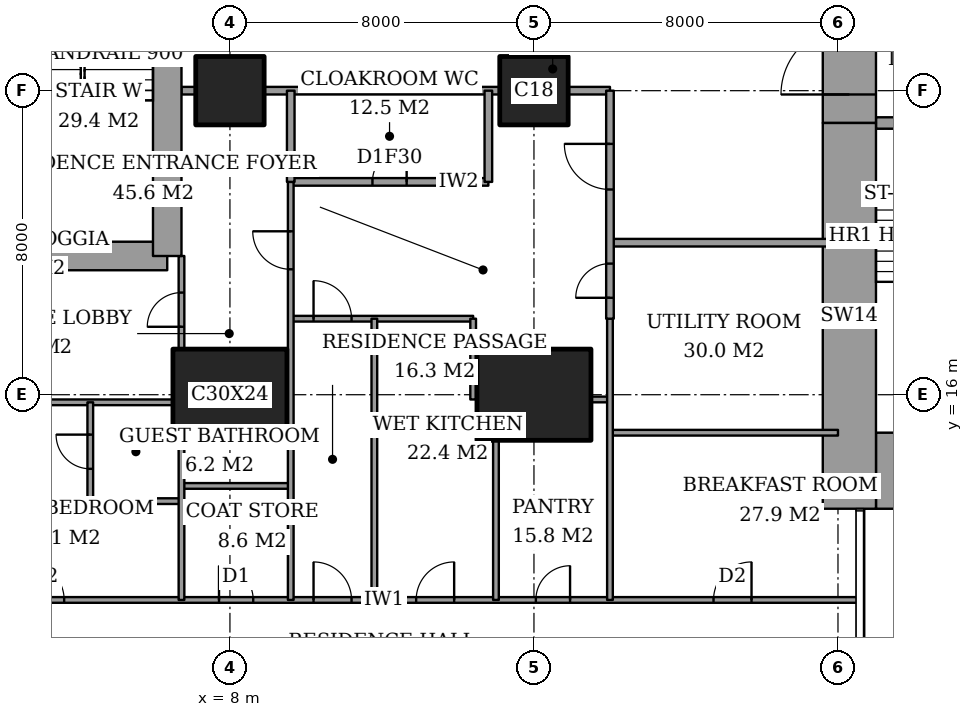
"""IFC4 building model, lengths in metres.
Left out: names, types, materials, properties, quantities, classifications, styles, units other than length and angle.
Written with IfcOpenShell. Run it as: python <this file> out.ifc"""

import sys

from ifc_helpers import new_model, si_unit, direction, frame, frame_2d, origin, origin_2d, place, context, subcontext, project, spatial, rectangle, extrude, element, fill, save


model = new_model("IFC4")
c1 = context("Model", 3, precision=1e-05, world=origin(), true_north=direction((0.0, 1.0)))
c2 = subcontext(c1, "Body", "Model", "MODEL_VIEW")
j1 = project(units=[si_unit("LENGTHUNIT", "METRE"), si_unit("PLANEANGLEUNIT", "RADIAN")], contexts=[c1])
p1 = place(None, origin())
s1 = spatial("IfcSite", under=j1, at=p1, CompositionType="ELEMENT")
p2 = place(p1, origin())
s2 = spatial("IfcBuilding", under=s1, at=p2, CompositionType="ELEMENT")
p3 = place(p2, frame((0.0, 0.0, 196.6)))
s3 = spatial("IfcBuildingStorey", under=s2, at=p3, CompositionType="ELEMENT", Elevation=196.6)
p4 = place(p3, frame((8.0, 16.0, 0.0), z_axis=(0.0, 0.0, 1.0), x_axis=(1.0, 0.0, 0.0)))
e1 = element("IfcColumn", 1, at=p4, inside=s3, PredefinedType="COLUMN", context=c2, shape_type="SweptSolid", body=[
    extrude(rectangle(XDim=3.0, YDim=2.4, at=origin_2d()), origin(), (0.0, 0.0, 1.0), 3.6),
])
p5 = place(p3, frame((8.0, 24.0, 0.0), z_axis=(0.0, 0.0, 1.0), x_axis=(1.0, 0.0, 0.0)))
e2 = element("IfcColumn", 2, at=p5, inside=s3, PredefinedType="COLUMN", context=c2, shape_type="SweptSolid", body=[
    extrude(rectangle(XDim=1.8, YDim=1.8, at=origin_2d()), origin(), (0.0, 0.0, 1.0), 3.6),
])
p6 = place(p3, frame((16.0, 16.0, 0.0), z_axis=(0.0, 0.0, 1.0), x_axis=(1.0, 0.0, 0.0)))
e3 = element("IfcColumn", 3, at=p6, inside=s3, PredefinedType="COLUMN", context=c2, shape_type="SweptSolid", body=[
    extrude(rectangle(XDim=3.0, YDim=2.4, at=origin_2d()), origin(), (0.0, 0.0, 1.0), 3.6),
])
p7 = place(p3, frame((16.0, 24.0, 0.0), z_axis=(0.0, 0.0, 1.0), x_axis=(1.0, 0.0, 0.0)))
e4 = element("IfcColumn", 4, at=p7, inside=s3, PredefinedType="COLUMN", context=c2, shape_type="SweptSolid", body=[
    extrude(rectangle(XDim=1.8, YDim=1.8, at=origin_2d()), origin(), (0.0, 0.0, 1.0), 3.6),
])
p8 = place(p3, frame((25.0, 14.0, 0.0), z_axis=(0.0, 0.0, 1.0), x_axis=(1.0, 0.0, 0.0)))
e5 = element("IfcWall", 5, at=p8, inside=s3, PredefinedType="SHEAR", context=c2, shape_type="SweptSolid", body=[
    extrude(rectangle(XDim=3.15, YDim=2.0, at=frame_2d((1.575, 0.0))), origin(), (0.0, 0.0, 1.0), 3.6),
])
p9 = place(p3, frame((24.3, 13.0, 0.0), z_axis=(0.0, 0.0, 1.0), x_axis=(0.0, 1.0, 0.0)))
e6 = element("IfcWall", 6, at=p9, inside=s3, PredefinedType="SHEAR", context=c2, shape_type="SweptSolid", body=[
    extrude(rectangle(XDim=10.15, YDim=1.4, at=frame_2d((5.075, 0.0))), origin(), (0.0, 0.0, 1.0), 3.6),
])
p10 = place(p3, frame((24.3, 23.15, 0.0), z_axis=(0.0, 0.0, 1.0), x_axis=(0.0, 1.0, 0.0)))
e7 = element("IfcWall", 7, at=p10, inside=s3, PredefinedType="SHEAR", context=c2, shape_type="SweptSolid", body=[
    extrude(rectangle(XDim=11.85, YDim=1.4, at=frame_2d((5.925, 0.0))), origin(), (0.0, 0.0, 1.0), 3.6),
])
p11 = place(p10, frame((0.75, 0.0, 0.0)))
e8 = element("IfcOpeningElement", 8, at=p11, cuts=e7, PredefinedType="OPENING", context=c2, shape_type="SweptSolid", body=[
    extrude(rectangle(XDim=1.8, YDim=2.4, at=frame_2d((0.9, 1.2))), frame((0.0, 0.71, 0.0), z_axis=(0.0, -1.0, 0.0), x_axis=(1.0, 0.0, 0.0)), (0.0, 0.0, 1.0), 1.42),
])
p12 = place(p3, frame((25.0, 23.15, 0.0), z_axis=(0.0, 0.0, 1.0), x_axis=(1.0, 0.0, 0.0)))
e9 = element("IfcWall", 9, at=p12, inside=s3, PredefinedType="SHEAR", context=c2, shape_type="SweptSolid", body=[
    extrude(rectangle(XDim=3.15, YDim=0.3, at=frame_2d((1.575, 0.0))), origin(), (0.0, 0.0, 1.0), 3.6),
])
p13 = place(p12, frame((0.6, 0.0, 0.0)))
e10 = element("IfcOpeningElement", 10, at=p13, cuts=e9, PredefinedType="OPENING", context=c2, shape_type="SweptSolid", body=[
    extrude(rectangle(XDim=1.0, YDim=2.1, at=frame_2d((0.5, 1.05))), frame((0.0, 0.16, 0.0), z_axis=(0.0, -1.0, 0.0), x_axis=(1.0, 0.0, 0.0)), (0.0, 0.0, 1.0), 0.32),
])
p14 = place(p3, frame((1.9, 19.65, 0.0), z_axis=(0.0, 0.0, 1.0), x_axis=(1.0, 0.0, 0.0)))
e11 = element("IfcWall", 11, at=p14, inside=s3, PredefinedType="SHEAR", context=c2, shape_type="SweptSolid", body=[
    extrude(rectangle(XDim=4.45, YDim=0.75, at=frame_2d((2.225, 0.0))), origin(), (0.0, 0.0, 1.0), 3.6),
])
p15 = place(p3, frame((6.35, 19.65, 0.0), z_axis=(0.0, 0.0, 1.0), x_axis=(0.0, 1.0, 0.0)))
e12 = element("IfcWall", 12, at=p15, inside=s3, PredefinedType="SHEAR", context=c2, shape_type="SweptSolid", body=[
    extrude(rectangle(XDim=8.7, YDim=0.75, at=frame_2d((4.35, 0.0))), origin(), (0.0, 0.0, 1.0), 3.6),
])
p16 = place(p15, frame((6.725, 0.0, 0.0)))
e13 = element("IfcOpeningElement", 13, at=p16, cuts=e12, PredefinedType="OPENING", context=c2, shape_type="SweptSolid", body=[
    extrude(rectangle(XDim=1.0, YDim=2.1, at=frame_2d((0.5, 1.05))), frame((0.0, 0.385, 0.0), z_axis=(0.0, -1.0, 0.0), x_axis=(1.0, 0.0, 0.0)), (0.0, 0.0, 1.0), 0.77),
])
p17 = place(p3, frame((-0.45, 10.6, 0.0), z_axis=(0.0, 0.0, 1.0), x_axis=(1.0, 0.0, 0.0)))
e14 = element("IfcWall", 14, at=p17, inside=s3, PredefinedType="PARTITIONING", context=c2, shape_type="SweptSolid", body=[
    extrude(rectangle(XDim=25.011, YDim=0.15, at=frame_2d((12.505, 0.0))), origin(), (0.0, 0.0, 1.0), 3.35),
])
p18 = place(p17, frame((10.65, 0.0, 0.0)))
e15 = element("IfcOpeningElement", 15, at=p18, cuts=e14, PredefinedType="OPENING", context=c2, shape_type="SweptSolid", body=[
    extrude(rectangle(XDim=1.0, YDim=2.1, at=frame_2d((0.5, 1.05))), frame((0.0, 0.085, 0.0), z_axis=(0.0, -1.0, 0.0), x_axis=(1.0, 0.0, 0.0)), (0.0, 0.0, 1.0), 0.17),
])
p19 = place(p17, frame((3.087, 0.0, 0.0)))
e16 = element("IfcOpeningElement", 16, at=p19, cuts=e14, PredefinedType="OPENING", context=c2, shape_type="SweptSolid", body=[
    extrude(rectangle(XDim=1.0, YDim=2.1, at=frame_2d((0.5, 1.05))), frame((0.0, 0.085, 0.0), z_axis=(0.0, -1.0, 0.0), x_axis=(1.0, 0.0, 0.0)), (0.0, 0.0, 1.0), 0.17),
])
p20 = place(p17, frame((8.163, 0.0, 0.0)))
e17 = element("IfcOpeningElement", 17, at=p20, cuts=e14, PredefinedType="OPENING", context=c2, shape_type="SweptSolid", body=[
    extrude(rectangle(XDim=0.9, YDim=2.1, at=frame_2d((0.45, 1.05))), frame((0.0, 0.085, 0.0), z_axis=(0.0, -1.0, 0.0), x_axis=(1.0, 0.0, 0.0)), (0.0, 0.0, 1.0), 0.17),
])
p21 = place(p17, frame((13.35, 0.0, 0.0)))
e18 = element("IfcOpeningElement", 18, at=p21, cuts=e14, PredefinedType="OPENING", context=c2, shape_type="SweptSolid", body=[
    extrude(rectangle(XDim=1.0, YDim=2.1, at=frame_2d((0.5, 1.05))), frame((0.0, 0.085, 0.0), z_axis=(0.0, -1.0, 0.0), x_axis=(1.0, 0.0, 0.0)), (0.0, 0.0, 1.0), 0.17),
])
p22 = place(p17, frame((16.5, 0.0, 0.0)))
e19 = element("IfcOpeningElement", 19, at=p22, cuts=e14, PredefinedType="OPENING", context=c2, shape_type="SweptSolid", body=[
    extrude(rectangle(XDim=0.9, YDim=2.1, at=frame_2d((0.45, 1.05))), frame((0.0, 0.085, 0.0), z_axis=(0.0, -1.0, 0.0), x_axis=(1.0, 0.0, 0.0)), (0.0, 0.0, 1.0), 0.17),
])
p23 = place(p17, frame((21.175, 0.0, 0.0)))
e20 = element("IfcOpeningElement", 20, at=p23, cuts=e14, PredefinedType="OPENING", context=c2, shape_type="SweptSolid", body=[
    extrude(rectangle(XDim=1.0, YDim=2.1, at=frame_2d((0.5, 1.05))), frame((0.0, 0.085, 0.0), z_axis=(0.0, -1.0, 0.0), x_axis=(1.0, 0.0, 0.0)), (0.0, 0.0, 1.0), 0.17),
])
p24 = place(p3, frame((4.325, 13.2, 0.0), z_axis=(0.0, 0.0, 1.0), x_axis=(1.0, 0.0, 0.0)))
e21 = element("IfcWall", 21, at=p24, inside=s3, PredefinedType="PARTITIONING", context=c2, shape_type="SweptSolid", body=[
    extrude(rectangle(XDim=2.4, YDim=0.15, at=frame_2d((1.2, 0.0))), origin(), (0.0, 0.0, 1.0), 3.35),
])
p25 = place(p3, frame((6.725, 13.6, 0.0), z_axis=(0.0, 0.0, 1.0), x_axis=(1.0, 0.0, 0.0)))
e22 = element("IfcWall", 22, at=p25, inside=s3, PredefinedType="PARTITIONING", context=c2, shape_type="SweptSolid", body=[
    extrude(rectangle(XDim=2.875, YDim=0.15, at=frame_2d((1.438, 0.0))), origin(), (0.0, 0.0, 1.0), 3.35),
])
p26 = place(p3, frame((18.0, 15.0, 0.0), z_axis=(0.0, 0.0, 1.0), x_axis=(1.0, 0.0, 0.0)))
e23 = element("IfcWall", 23, at=p26, inside=s3, PredefinedType="PARTITIONING", context=c2, shape_type="SweptSolid", body=[
    extrude(rectangle(XDim=6.0, YDim=0.15, at=frame_2d((3.0, 0.0))), origin(), (0.0, 0.0, 1.0), 3.35),
])
p27 = place(p3, frame((1.25, 15.8, 0.0), z_axis=(0.0, 0.0, 1.0), x_axis=(1.0, 0.0, 0.0)))
e24 = element("IfcWall", 24, at=p27, inside=s3, PredefinedType="PARTITIONING", context=c2, shape_type="SweptSolid", body=[
    extrude(rectangle(XDim=5.25, YDim=0.15, at=frame_2d((2.625, 0.0))), origin(), (0.0, 0.0, 1.0), 3.35),
])
p28 = place(p3, frame((17.5, 15.875, 0.0), z_axis=(0.0, 0.0, 1.0), x_axis=(1.0, 0.0, 0.0)))
e25 = element("IfcWall", 25, at=p28, inside=s3, PredefinedType="PARTITIONING", context=c2, shape_type="SweptSolid", body=[
    extrude(rectangle(XDim=0.5, YDim=0.15, at=frame_2d((0.25, 0.0))), origin(), (0.0, 0.0, 1.0), 3.35),
])
p29 = place(p3, frame((9.6, 18.0, 0.0), z_axis=(0.0, 0.0, 1.0), x_axis=(1.0, 0.0, 0.0)))
e26 = element("IfcWall", 26, at=p29, inside=s3, PredefinedType="PARTITIONING", context=c2, shape_type="SweptSolid", body=[
    extrude(rectangle(XDim=4.8, YDim=0.15, at=frame_2d((2.4, 0.0))), origin(), (0.0, 0.0, 1.0), 3.35),
])
p30 = place(p29, frame((0.6, 0.0, 0.0)))
e27 = element("IfcOpeningElement", 27, at=p30, cuts=e26, PredefinedType="OPENING", context=c2, shape_type="SweptSolid", body=[
    extrude(rectangle(XDim=1.0, YDim=2.1, at=frame_2d((0.5, 1.05))), frame((0.0, 0.085, 0.0), z_axis=(0.0, -1.0, 0.0), x_axis=(1.0, 0.0, 0.0)), (0.0, 0.0, 1.0), 0.17),
])
p31 = place(p3, frame((18.0, 20.0, 0.0), z_axis=(0.0, 0.0, 1.0), x_axis=(1.0, 0.0, 0.0)))
e28 = element("IfcWall", 28, at=p31, inside=s3, PredefinedType="PARTITIONING", context=c2, shape_type="SweptSolid", body=[
    extrude(rectangle(XDim=6.0, YDim=0.2, at=frame_2d((3.0, 0.0))), origin(), (0.0, 0.0, 1.0), 3.35),
])
p32 = place(p3, frame((9.6, 21.6, 0.0), z_axis=(0.0, 0.0, 1.0), x_axis=(1.0, 0.0, 0.0)))
e29 = element("IfcWall", 29, at=p32, inside=s3, PredefinedType="PARTITIONING", context=c2, shape_type="SweptSolid", body=[
    extrude(rectangle(XDim=5.2, YDim=0.2, at=frame_2d((2.6, 0.0))), origin(), (0.0, 0.0, 1.0), 3.35),
])
p33 = place(p32, frame((2.15, 0.0, 0.0)))
e30 = element("IfcOpeningElement", 30, at=p33, cuts=e29, PredefinedType="OPENING", context=c2, shape_type="SweptSolid", body=[
    extrude(rectangle(XDim=0.9, YDim=2.1, at=frame_2d((0.45, 1.05))), frame((0.0, 0.11, 0.0), z_axis=(0.0, -1.0, 0.0), x_axis=(1.0, 0.0, 0.0)), (0.0, 0.0, 1.0), 0.22),
])
p34 = place(p3, frame((6.725, 24.0, 0.0), z_axis=(0.0, 0.0, 1.0), x_axis=(1.0, 0.0, 0.0)))
e31 = element("IfcWall", 31, at=p34, inside=s3, PredefinedType="PARTITIONING", context=c2, shape_type="SweptSolid", body=[
    extrude(rectangle(XDim=0.375, YDim=0.2, at=frame_2d((0.188, 0.0))), origin(), (0.0, 0.0, 1.0), 3.35),
])
p35 = place(p3, frame((8.9, 24.0, 0.0), z_axis=(0.0, 0.0, 1.0), x_axis=(1.0, 0.0, 0.0)))
e32 = element("IfcWall", 32, at=p35, inside=s3, PredefinedType="PARTITIONING", context=c2, shape_type="SweptSolid", body=[
    extrude(rectangle(XDim=6.2, YDim=0.2, at=frame_2d((3.1, 0.0))), origin(), (0.0, 0.0, 1.0), 3.35),
])
p36 = place(p3, frame((16.9, 24.0, 0.0), z_axis=(0.0, 0.0, 1.0), x_axis=(1.0, 0.0, 0.0)))
e33 = element("IfcWall", 33, at=p36, inside=s3, PredefinedType="PARTITIONING", context=c2, shape_type="SweptSolid", body=[
    extrude(rectangle(XDim=1.1, YDim=0.2, at=frame_2d((0.55, 0.0))), origin(), (0.0, 0.0, 1.0), 3.35),
])
p37 = place(p3, frame((4.325, 13.2, 0.0), z_axis=(0.0, 0.0, 1.0), x_axis=(0.0, 1.0, 0.0)))
e34 = element("IfcWall", 34, at=p37, inside=s3, PredefinedType="PARTITIONING", context=c2, shape_type="SweptSolid", body=[
    extrude(rectangle(XDim=2.6, YDim=0.15, at=frame_2d((1.3, 0.0))), origin(), (0.0, 0.0, 1.0), 3.35),
])
p38 = place(p37, frame((0.85, 0.0, 0.0)))
e35 = element("IfcOpeningElement", 35, at=p38, cuts=e34, PredefinedType="OPENING", context=c2, shape_type="SweptSolid", body=[
    extrude(rectangle(XDim=0.9, YDim=2.1, at=frame_2d((0.45, 1.05))), frame((0.0, 0.085, 0.0), z_axis=(0.0, -1.0, 0.0), x_axis=(1.0, 0.0, 0.0)), (0.0, 0.0, 1.0), 0.17),
])
p39 = place(p3, frame((6.725, 10.6, 0.0), z_axis=(0.0, 0.0, 1.0), x_axis=(0.0, 1.0, 0.0)))
e36 = element("IfcWall", 36, at=p39, inside=s3, PredefinedType="PARTITIONING", context=c2, shape_type="SweptSolid", body=[
    extrude(rectangle(XDim=4.2, YDim=0.15, at=frame_2d((2.1, 0.0))), origin(), (0.0, 0.0, 1.0), 3.35),
])
p40 = place(p3, frame((6.725, 17.2, 0.0), z_axis=(0.0, 0.0, 1.0), x_axis=(0.0, 1.0, 0.0)))
e37 = element("IfcWall", 37, at=p40, inside=s3, PredefinedType="PARTITIONING", context=c2, shape_type="SweptSolid", body=[
    extrude(rectangle(XDim=2.45, YDim=0.15, at=frame_2d((1.225, 0.0))), origin(), (0.0, 0.0, 1.0), 3.35),
])
p41 = place(p40, frame((0.587, 0.0, 0.0)))
e38 = element("IfcOpeningElement", 38, at=p41, cuts=e37, PredefinedType="OPENING", context=c2, shape_type="SweptSolid", body=[
    extrude(rectangle(XDim=0.9, YDim=2.1, at=frame_2d((0.45, 1.05))), frame((0.0, 0.085, 0.0), z_axis=(0.0, -1.0, 0.0), x_axis=(1.0, 0.0, 0.0)), (0.0, 0.0, 1.0), 0.17),
])
p42 = place(p3, frame((9.6, 21.6, 0.0), z_axis=(0.0, 0.0, 1.0), x_axis=(0.0, 1.0, 0.0)))
e39 = element("IfcWall", 39, at=p42, inside=s3, PredefinedType="PARTITIONING", context=c2, shape_type="SweptSolid", body=[
    extrude(rectangle(XDim=2.4, YDim=0.2, at=frame_2d((1.2, 0.0))), origin(), (0.0, 0.0, 1.0), 3.35),
])
p43 = place(p3, frame((9.6, 10.6, 0.0), z_axis=(0.0, 0.0, 1.0), x_axis=(0.0, 1.0, 0.0)))
e40 = element("IfcWall", 40, at=p43, inside=s3, PredefinedType="PARTITIONING", context=c2, shape_type="SweptSolid", body=[
    extrude(rectangle(XDim=11.0, YDim=0.15, at=frame_2d((5.5, 0.0))), origin(), (0.0, 0.0, 1.0), 3.35),
])
p44 = place(p43, frame((8.7, 0.0, 0.0)))
e41 = element("IfcOpeningElement", 41, at=p44, cuts=e40, PredefinedType="OPENING", context=c2, shape_type="SweptSolid", body=[
    extrude(rectangle(XDim=1.0, YDim=2.1, at=frame_2d((0.5, 1.05))), frame((0.0, 0.085, 0.0), z_axis=(0.0, -1.0, 0.0), x_axis=(1.0, 0.0, 0.0)), (0.0, 0.0, 1.0), 0.17),
])
p45 = place(p3, frame((11.8, 10.6, 0.0), z_axis=(0.0, 0.0, 1.0), x_axis=(0.0, 1.0, 0.0)))
e42 = element("IfcWall", 42, at=p45, inside=s3, PredefinedType="PARTITIONING", context=c2, shape_type="SweptSolid", body=[
    extrude(rectangle(XDim=7.4, YDim=0.15, at=frame_2d((3.7, 0.0))), origin(), (0.0, 0.0, 1.0), 3.35),
])
p46 = place(p3, frame((14.4, 15.875, 0.0), z_axis=(0.0, 0.0, 1.0), x_axis=(0.0, 1.0, 0.0)))
e43 = element("IfcWall", 43, at=p46, inside=s3, PredefinedType="PARTITIONING", context=c2, shape_type="SweptSolid", body=[
    extrude(rectangle(XDim=2.125, YDim=0.15, at=frame_2d((1.062, 0.0))), origin(), (0.0, 0.0, 1.0), 3.35),
])
p47 = place(p3, frame((14.8, 21.6, 0.0), z_axis=(0.0, 0.0, 1.0), x_axis=(0.0, 1.0, 0.0)))
e44 = element("IfcWall", 44, at=p47, inside=s3, PredefinedType="PARTITIONING", context=c2, shape_type="SweptSolid", body=[
    extrude(rectangle(XDim=2.4, YDim=0.2, at=frame_2d((1.2, 0.0))), origin(), (0.0, 0.0, 1.0), 3.35),
])
p48 = place(p3, frame((15.0, 10.6, 0.0), z_axis=(0.0, 0.0, 1.0), x_axis=(0.0, 1.0, 0.0)))
e45 = element("IfcWall", 45, at=p48, inside=s3, PredefinedType="PARTITIONING", context=c2, shape_type="SweptSolid", body=[
    extrude(rectangle(XDim=4.2, YDim=0.15, at=frame_2d((2.1, 0.0))), origin(), (0.0, 0.0, 1.0), 3.35),
])
p49 = place(p3, frame((18.0, 18.0, 0.0), z_axis=(0.0, 0.0, 1.0), x_axis=(0.0, 1.0, 0.0)))
e46 = element("IfcWall", 46, at=p49, inside=s3, PredefinedType="PARTITIONING", context=c2, shape_type="SweptSolid", body=[
    extrude(rectangle(XDim=6.0, YDim=0.2, at=frame_2d((3.0, 0.0))), origin(), (0.0, 0.0, 1.0), 3.35),
])
p50 = place(p49, frame((3.4, 0.0, 0.0)))
e47 = element("IfcOpeningElement", 47, at=p50, cuts=e46, PredefinedType="OPENING", context=c2, shape_type="SweptSolid", body=[
    extrude(rectangle(XDim=1.2, YDim=2.4, at=frame_2d((0.6, 1.2))), frame((0.0, 0.11, 0.0), z_axis=(0.0, -1.0, 0.0), x_axis=(1.0, 0.0, 0.0)), (0.0, 0.0, 1.0), 0.22),
])
p51 = place(p49, frame((0.55, 0.0, 0.0)))
e48 = element("IfcOpeningElement", 48, at=p51, cuts=e46, PredefinedType="OPENING", context=c2, shape_type="SweptSolid", body=[
    extrude(rectangle(XDim=0.9, YDim=2.1, at=frame_2d((0.45, 1.05))), frame((0.0, 0.11, 0.0), z_axis=(0.0, -1.0, 0.0), x_axis=(1.0, 0.0, 0.0)), (0.0, 0.0, 1.0), 0.22),
])
p52 = place(p3, frame((18.0, 10.6, 0.0), z_axis=(0.0, 0.0, 1.0), x_axis=(0.0, 1.0, 0.0)))
e49 = element("IfcWall", 49, at=p52, inside=s3, PredefinedType="PARTITIONING", context=c2, shape_type="SweptSolid", body=[
    extrude(rectangle(XDim=7.4, YDim=0.15, at=frame_2d((3.7, 0.0))), origin(), (0.0, 0.0, 1.0), 3.35),
])
p53 = place(p18, origin())
e50 = element("IfcDoor", 50, at=p53, inside=s3, OperationType="SINGLE_SWING_RIGHT", PredefinedType="DOOR", context=c2, shape_type="SweptSolid", body=[
    extrude(rectangle(XDim=1.0, YDim=2.1, at=frame_2d((0.5, 1.05))), frame((0.0, 0.025, 0.0), z_axis=(0.0, -1.0, 0.0), x_axis=(1.0, 0.0, 0.0)), (0.0, 0.0, 1.0), 0.05),
])
fill(e15, e50)
p54 = place(p38, origin())
e51 = element("IfcDoor", 51, at=p54, inside=s3, OperationType="SINGLE_SWING_LEFT", PredefinedType="DOOR", context=c2, shape_type="SweptSolid", body=[
    extrude(rectangle(XDim=0.9, YDim=2.1, at=frame_2d((0.45, 1.05))), frame((0.0, 0.025, 0.0), z_axis=(0.0, -1.0, 0.0), x_axis=(1.0, 0.0, 0.0)), (0.0, 0.0, 1.0), 0.05),
])
fill(e35, e51)
p55 = place(p19, origin())
e52 = element("IfcDoor", 52, at=p55, inside=s3, OperationType="SINGLE_SWING_RIGHT", PredefinedType="DOOR", context=c2, shape_type="SweptSolid", body=[
    extrude(rectangle(XDim=1.0, YDim=2.1, at=frame_2d((0.5, 1.05))), frame((0.0, 0.025, 0.0), z_axis=(0.0, -1.0, 0.0), x_axis=(1.0, 0.0, 0.0)), (0.0, 0.0, 1.0), 0.05),
])
fill(e16, e52)
p56 = place(p41, origin())
e53 = element("IfcDoor", 53, at=p56, inside=s3, OperationType="SINGLE_SWING_RIGHT", PredefinedType="DOOR", context=c2, shape_type="SweptSolid", body=[
    extrude(rectangle(XDim=0.9, YDim=2.1, at=frame_2d((0.45, 1.05))), frame((0.0, 0.025, 0.0), z_axis=(0.0, -1.0, 0.0), x_axis=(1.0, 0.0, 0.0)), (0.0, 0.0, 1.0), 0.05),
])
fill(e38, e53)
p57 = place(p20, origin())
e54 = element("IfcDoor", 54, at=p57, inside=s3, OperationType="SINGLE_SWING_RIGHT", PredefinedType="DOOR", context=c2, shape_type="SweptSolid", body=[
    extrude(rectangle(XDim=0.9, YDim=2.1, at=frame_2d((0.45, 1.05))), frame((0.0, 0.025, 0.0), z_axis=(0.0, -1.0, 0.0), x_axis=(1.0, 0.0, 0.0)), (0.0, 0.0, 1.0), 0.05),
])
fill(e17, e54)
p58 = place(p44, origin())
e55 = element("IfcDoor", 55, at=p58, inside=s3, OperationType="SINGLE_SWING_LEFT", PredefinedType="DOOR", context=c2, shape_type="SweptSolid", body=[
    extrude(rectangle(XDim=1.0, YDim=2.1, at=frame_2d((0.5, 1.05))), frame((0.0, 0.025, 0.0), z_axis=(0.0, -1.0, 0.0), x_axis=(1.0, 0.0, 0.0)), (0.0, 0.0, 1.0), 0.05),
])
fill(e41, e55)
p59 = place(p33, origin())
e56 = element("IfcDoor", 56, at=p59, inside=s3, OperationType="SINGLE_SWING_LEFT", PredefinedType="DOOR", context=c2, shape_type="SweptSolid", body=[
    extrude(rectangle(XDim=0.9, YDim=2.1, at=frame_2d((0.45, 1.05))), frame((0.0, 0.025, 0.0), z_axis=(0.0, -1.0, 0.0), x_axis=(1.0, 0.0, 0.0)), (0.0, 0.0, 1.0), 0.05),
])
fill(e30, e56)
p60 = place(p50, origin())
e57 = element("IfcDoor", 57, at=p60, inside=s3, OperationType="SINGLE_SWING_LEFT", PredefinedType="DOOR", context=c2, shape_type="SweptSolid", body=[
    extrude(rectangle(XDim=1.2, YDim=2.4, at=frame_2d((0.6, 1.2))), frame((0.0, 0.025, 0.0), z_axis=(0.0, -1.0, 0.0), x_axis=(1.0, 0.0, 0.0)), (0.0, 0.0, 1.0), 0.05),
])
fill(e47, e57)
p61 = place(p30, origin())
e58 = element("IfcDoor", 58, at=p61, inside=s3, OperationType="SINGLE_SWING_RIGHT", PredefinedType="DOOR", context=c2, shape_type="SweptSolid", body=[
    extrude(rectangle(XDim=1.0, YDim=2.1, at=frame_2d((0.5, 1.05))), frame((0.0, 0.025, 0.0), z_axis=(0.0, -1.0, 0.0), x_axis=(1.0, 0.0, 0.0)), (0.0, 0.0, 1.0), 0.05),
])
fill(e27, e58)
p62 = place(p21, origin())
e59 = element("IfcDoor", 59, at=p62, inside=s3, OperationType="SINGLE_SWING_LEFT", PredefinedType="DOOR", context=c2, shape_type="SweptSolid", body=[
    extrude(rectangle(XDim=1.0, YDim=2.1, at=frame_2d((0.5, 1.05))), frame((0.0, 0.025, 0.0), z_axis=(0.0, -1.0, 0.0), x_axis=(1.0, 0.0, 0.0)), (0.0, 0.0, 1.0), 0.05),
])
fill(e18, e59)
p63 = place(p22, origin())
e60 = element("IfcDoor", 60, at=p63, inside=s3, OperationType="SINGLE_SWING_LEFT", PredefinedType="DOOR", context=c2, shape_type="SweptSolid", body=[
    extrude(rectangle(XDim=0.9, YDim=2.1, at=frame_2d((0.45, 1.05))), frame((0.0, 0.025, 0.0), z_axis=(0.0, -1.0, 0.0), x_axis=(1.0, 0.0, 0.0)), (0.0, 0.0, 1.0), 0.05),
])
fill(e19, e60)
p64 = place(p23, origin())
e61 = element("IfcDoor", 61, at=p64, inside=s3, OperationType="SINGLE_SWING_LEFT", PredefinedType="DOOR", context=c2, shape_type="SweptSolid", body=[
    extrude(rectangle(XDim=1.0, YDim=2.1, at=frame_2d((0.5, 1.05))), frame((0.0, 0.025, 0.0), z_axis=(0.0, -1.0, 0.0), x_axis=(1.0, 0.0, 0.0)), (0.0, 0.0, 1.0), 0.05),
])
fill(e20, e61)
p65 = place(p51, origin())
e62 = element("IfcDoor", 62, at=p65, inside=s3, OperationType="SINGLE_SWING_RIGHT", PredefinedType="DOOR", context=c2, shape_type="SweptSolid", body=[
    extrude(rectangle(XDim=0.9, YDim=2.1, at=frame_2d((0.45, 1.05))), frame((0.0, 0.025, 0.0), z_axis=(0.0, -1.0, 0.0), x_axis=(1.0, 0.0, 0.0)), (0.0, 0.0, 1.0), 0.05),
])
fill(e48, e62)
p66 = place(p11, origin())
e63 = element("IfcDoor", 63, at=p66, inside=s3, OperationType="DOUBLE_DOOR_DOUBLE_SWING", PredefinedType="DOOR", context=c2, shape_type="SweptSolid", body=[
    extrude(rectangle(XDim=1.8, YDim=2.4, at=frame_2d((0.9, 1.2))), frame((0.0, 0.025, 0.0), z_axis=(0.0, -1.0, 0.0), x_axis=(1.0, 0.0, 0.0)), (0.0, 0.0, 1.0), 0.05),
])
fill(e8, e63)
save(model, sys.argv[1])
